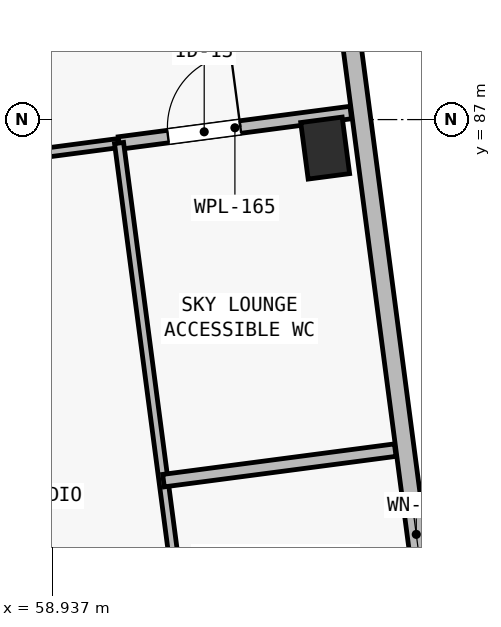
"""IFC4 building model, lengths in metres.
Left out: names, types, materials, properties, quantities, classifications, styles, units other than length and angle.
Written with IfcOpenShell. Run it as: python <this file> out.ifc"""

import sys

from ifc_helpers import new_model, si_unit, direction, frame, frame_2d, origin, origin_2d, place, context, subcontext, project, spatial, rectangle, extrude, element, fill, save


model = new_model("IFC4")
c1 = context("Model", 3, precision=1e-05, world=origin(), true_north=direction((0.0, 1.0)))
c2 = subcontext(c1, "Body", "Model", "MODEL_VIEW")
j1 = project(units=[si_unit("LENGTHUNIT", "METRE"), si_unit("PLANEANGLEUNIT", "RADIAN")], contexts=[c1])
p1 = place(None, origin())
s1 = spatial("IfcSite", under=j1, at=p1, CompositionType="ELEMENT")
p2 = place(p1, origin())
s2 = spatial("IfcBuilding", under=s1, at=p2, CompositionType="ELEMENT")
p3 = place(p2, frame((0.0, 0.0, 21.4)))
s3 = spatial("IfcBuildingStorey", under=s2, at=p3, CompositionType="ELEMENT", Elevation=21.4)
p4 = place(p3, frame((62.53, 86.625, 0.0), z_axis=(0.0, 0.0, 1.0), x_axis=(0.991444861374, 0.13052619222, 0.0)))
e1 = element("IfcColumn", 1, at=p4, inside=s3, PredefinedType="COLUMN", context=c2, shape_type="SweptSolid", body=[
    extrude(rectangle(XDim=0.55, YDim=0.75, at=origin_2d()), origin(), (0.0, 0.0, 1.0), 3.25),
])
p5 = place(p3, frame((61.39, 99.31, 0.0), z_axis=(0.0, 0.0, 1.0), x_axis=(0.13052411616, -0.99144513469, 0.0)))
e2 = element("IfcWall", 2, at=p5, inside=s3, PredefinedType="SOLIDWALL", context=c2, shape_type="SweptSolid", body=[
    extrude(rectangle(XDim=21.05, YDim=0.24, at=frame_2d((10.525, 0.0))), origin(), (0.0, 0.0, 1.0), 3.0),
])
p6 = place(p5, frame((2.81, 0.0, 0.45)))
e3 = element("IfcOpeningElement", 3, at=p6, cuts=e2, PredefinedType="OPENING", context=c2, shape_type="SweptSolid", body=[
    extrude(rectangle(XDim=0.8, YDim=2.3, at=frame_2d((0.4, 1.15))), frame((0.0, 0.135, 0.0), z_axis=(0.0, -1.0, 0.0), x_axis=(1.0, 0.0, 0.0)), (0.0, 0.0, 1.0), 0.27),
])
p7 = place(p5, frame((17.6, 0.0, 0.52)))
e4 = element("IfcOpeningElement", 4, at=p7, cuts=e2, PredefinedType="OPENING", context=c2, shape_type="SweptSolid", body=[
    extrude(rectangle(XDim=0.64, YDim=2.18, at=frame_2d((0.32, 1.09))), frame((0.0, 0.135, 0.0), z_axis=(0.0, -1.0, 0.0), x_axis=(1.0, 0.0, 0.0)), (0.0, 0.0, 1.0), 0.27),
])
p8 = place(p3, frame((54.033, 85.93, 0.0), z_axis=(0.0, 0.0, 1.0), x_axis=(0.991442898952, 0.130541097431, 0.0)))
e5 = element("IfcWall", 5, at=p8, inside=s3, PredefinedType="PARTITIONING", context=c2, shape_type="SweptSolid", body=[
    extrude(rectangle(XDim=5.835, YDim=0.12, at=frame_2d((2.917, 0.0))), origin(), (0.0, 0.0, 1.0), 2.97),
])
p9 = place(p8, frame((1.15, 0.0, 0.0)))
e6 = element("IfcOpeningElement", 6, at=p9, cuts=e5, PredefinedType="OPENING", context=c2, shape_type="SweptSolid", body=[
    extrude(rectangle(XDim=1.15, YDim=2.15, at=frame_2d((0.575, 1.075))), frame((0.0, 0.075, 0.0), z_axis=(0.0, -1.0, 0.0), x_axis=(1.0, 0.0, 0.0)), (0.0, 0.0, 1.0), 0.15),
])
p10 = place(p3, frame((59.818, 86.692, 0.0), z_axis=(0.0, 0.0, 1.0), x_axis=(0.991444293548, 0.130530505213, 0.0)))
e7 = element("IfcWall", 7, at=p10, inside=s3, PredefinedType="PLUMBINGWALL", context=c2, shape_type="SweptSolid", body=[
    extrude(rectangle(XDim=3.075, YDim=0.165, at=frame_2d((1.538, 0.0))), origin(), (0.0, 0.0, 1.0), 2.97),
])
p11 = place(p10, frame((0.65, 0.0, 0.0)))
e8 = element("IfcOpeningElement", 8, at=p11, cuts=e7, PredefinedType="OPENING", context=c2, shape_type="SweptSolid", body=[
    extrude(rectangle(XDim=0.96, YDim=2.12, at=frame_2d((0.48, 1.06))), frame((0.0, 0.097, 0.0), z_axis=(0.0, -1.0, 0.0), x_axis=(1.0, 0.0, 0.0)), (0.0, 0.0, 1.0), 0.195),
])
p12 = place(p3, frame((60.942, 78.155, 0.0), z_axis=(0.0, 0.0, 1.0), x_axis=(-0.13051979335, 0.99144570378, 0.0)))
e9 = element("IfcWall", 9, at=p12, inside=s3, PredefinedType="PARTITIONING", context=c2, shape_type="SweptSolid", body=[
    extrude(rectangle(XDim=8.61, YDim=0.12, at=frame_2d((4.305, 0.0))), origin(), (0.0, 0.0, 1.0), 2.97),
])
p13 = place(p12, frame((1.25, 0.0, 0.0)))
e10 = element("IfcOpeningElement", 10, at=p13, cuts=e9, PredefinedType="OPENING", context=c2, shape_type="SweptSolid", body=[
    extrude(rectangle(XDim=0.9, YDim=2.1, at=frame_2d((0.45, 1.05))), frame((0.0, 0.075, 0.0), z_axis=(0.0, -1.0, 0.0), x_axis=(1.0, 0.0, 0.0)), (0.0, 0.0, 1.0), 0.15),
])
p14 = place(p3, frame((60.403, 82.25, 0.0), z_axis=(0.0, 0.0, 1.0), x_axis=(0.991444293548, 0.130530505213, 0.0)))
e11 = element("IfcWall", 11, at=p14, inside=s3, PredefinedType="PLUMBINGWALL", context=c2, shape_type="SweptSolid", body=[
    extrude(rectangle(XDim=3.075, YDim=0.165, at=frame_2d((1.538, 0.0))), origin(), (0.0, 0.0, 1.0), 2.97),
])
p15 = place(p7, origin())
e12 = element("IfcWindow", 12, at=p15, inside=s3, PartitioningType="SINGLE_PANEL", PredefinedType="WINDOW", context=c2, shape_type="SweptSolid", body=[
    extrude(rectangle(XDim=0.64, YDim=2.18, at=frame_2d((0.32, 1.09))), frame((0.0, 0.03, 0.0), z_axis=(0.0, -1.0, 0.0), x_axis=(1.0, 0.0, 0.0)), (0.0, 0.0, 1.0), 0.06),
])
fill(e4, e12)
p16 = place(p11, origin())
e13 = element("IfcDoor", 13, at=p16, inside=s3, OperationType="SINGLE_SWING_RIGHT", PredefinedType="DOOR", context=c2, shape_type="SweptSolid", body=[
    extrude(rectangle(XDim=0.96, YDim=2.12, at=frame_2d((0.48, 1.06))), frame((0.0, 0.025, 0.0), z_axis=(0.0, -1.0, 0.0), x_axis=(1.0, 0.0, 0.0)), (0.0, 0.0, 1.0), 0.05),
])
fill(e8, e13)
save(model, sys.argv[1])
